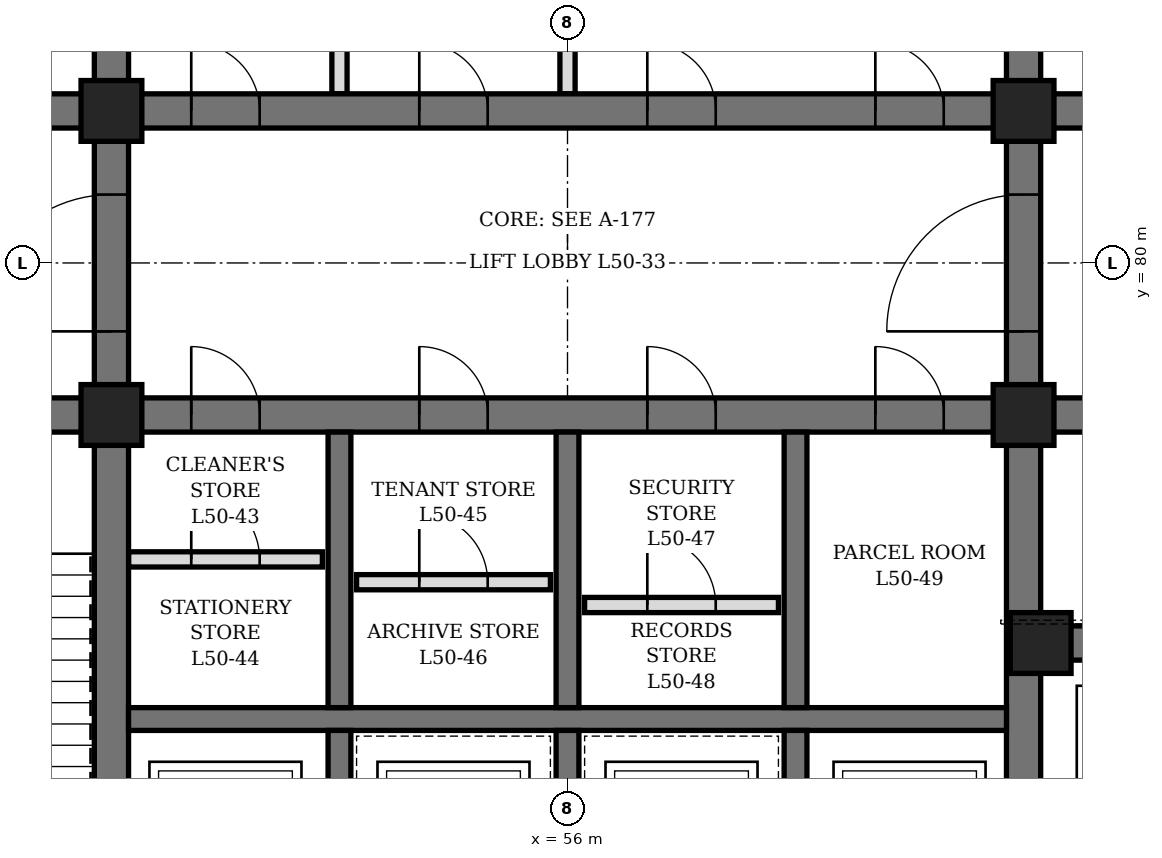
"""IFC4 building model, lengths in metres.
Left out: names, types, materials, properties, quantities, classifications, styles, units other than length and angle.
Written with IfcOpenShell. Run it as: python <this file> out.ifc"""

import sys

from ifc_helpers import new_model, si_unit, direction, frame, frame_2d, origin, origin_2d, place, context, subcontext, project, spatial, rectangle, hollow_rectangle, extrude, element, fill, save


model = new_model("IFC4")
c1 = context("Model", 3, precision=1e-05, world=origin(), true_north=direction((0.0, 1.0)))
c2 = subcontext(c1, "Body", "Model", "MODEL_VIEW")
j1 = project(units=[si_unit("LENGTHUNIT", "METRE"), si_unit("PLANEANGLEUNIT", "RADIAN")], contexts=[c1])
p1 = place(None, origin())
s1 = spatial("IfcSite", under=j1, at=p1, CompositionType="ELEMENT")
p2 = place(p1, origin())
s2 = spatial("IfcBuilding", under=s1, at=p2, CompositionType="ELEMENT")
p3 = place(p2, frame((0.0, 0.0, 223.3)))
s3 = spatial("IfcBuildingStorey", under=s2, at=p3, CompositionType="ELEMENT", Elevation=223.3)
p4 = place(p3, frame((50.0, 71.6, 0.0), z_axis=(0.0, 0.0, 1.0), x_axis=(0.0, 1.0, 0.0)))
e1 = element("IfcWall", 1, at=p4, inside=s3, PredefinedType="SHEAR", context=c2, shape_type="SweptSolid", body=[
    extrude(rectangle(XDim=16.8, YDim=0.45, at=frame_2d((8.4, 0.0))), origin(), (0.0, 0.0, 1.0), 4.2),
])
p5 = place(p4, frame((7.5, 0.0, 0.0)))
e2 = element("IfcOpeningElement", 2, at=p5, cuts=e1, PredefinedType="OPENING", context=c2, shape_type="SweptSolid", body=[
    extrude(rectangle(XDim=1.8, YDim=2.4, at=frame_2d((0.9, 1.2))), frame((0.0, 0.235, 0.0), z_axis=(0.0, -1.0, 0.0), x_axis=(1.0, 0.0, 0.0)), (0.0, 0.0, 1.0), 0.47),
])
p6 = place(p3, frame((62.0, 71.6, 0.0), z_axis=(0.0, 0.0, 1.0), x_axis=(0.0, 1.0, 0.0)))
e3 = element("IfcWall", 3, at=p6, inside=s3, PredefinedType="SHEAR", context=c2, shape_type="SweptSolid", body=[
    extrude(rectangle(XDim=16.8, YDim=0.45, at=frame_2d((8.4, 0.0))), origin(), (0.0, 0.0, 1.0), 4.2),
])
p7 = place(p6, frame((7.5, 0.0, 0.0)))
e4 = element("IfcOpeningElement", 4, at=p7, cuts=e3, PredefinedType="OPENING", context=c2, shape_type="SweptSolid", body=[
    extrude(rectangle(XDim=1.8, YDim=2.4, at=frame_2d((0.9, 1.2))), frame((0.0, 0.235, 0.0), z_axis=(0.0, -1.0, 0.0), x_axis=(1.0, 0.0, 0.0)), (0.0, 0.0, 1.0), 0.47),
])
p8 = place(p3, frame((44.6, 78.0, 0.0), z_axis=(0.0, 0.0, 1.0), x_axis=(1.0, 0.0, 0.0)))
e5 = element("IfcWall", 5, at=p8, inside=s3, PredefinedType="SHEAR", context=c2, shape_type="SweptSolid", body=[
    extrude(rectangle(XDim=5.175, YDim=0.45, at=frame_2d((2.587, 0.0))), origin(), (0.0, 0.0, 1.0), 4.2),
])
p9 = place(p8, frame((1.8, 0.0, 0.0)))
e6 = element("IfcOpeningElement", 6, at=p9, cuts=e5, PredefinedType="OPENING", context=c2, shape_type="SweptSolid", body=[
    extrude(rectangle(XDim=1.2, YDim=2.1, at=frame_2d((0.6, 1.05))), frame((0.0, 0.235, 0.0), z_axis=(0.0, -1.0, 0.0), x_axis=(1.0, 0.0, 0.0)), (0.0, 0.0, 1.0), 0.47),
])
p10 = place(p3, frame((44.6, 82.0, 0.0), z_axis=(0.0, 0.0, 1.0), x_axis=(1.0, 0.0, 0.0)))
e7 = element("IfcWall", 7, at=p10, inside=s3, PredefinedType="SHEAR", context=c2, shape_type="SweptSolid", body=[
    extrude(rectangle(XDim=5.175, YDim=0.45, at=frame_2d((2.587, 0.0))), origin(), (0.0, 0.0, 1.0), 4.2),
])
p11 = place(p10, frame((0.7, 0.0, 0.0)))
e8 = element("IfcOpeningElement", 8, at=p11, cuts=e7, PredefinedType="OPENING", context=c2, shape_type="SweptSolid", body=[
    extrude(rectangle(XDim=0.9, YDim=2.1, at=frame_2d((0.45, 1.05))), frame((0.0, 0.235, 0.0), z_axis=(0.0, -1.0, 0.0), x_axis=(1.0, 0.0, 0.0)), (0.0, 0.0, 1.0), 0.47),
])
p12 = place(p3, frame((62.225, 75.0, 0.0), z_axis=(0.0, 0.0, 1.0), x_axis=(1.0, 0.0, 0.0)))
e9 = element("IfcWall", 9, at=p12, inside=s3, PredefinedType="SHEAR", context=c2, shape_type="SweptSolid", body=[
    extrude(rectangle(XDim=5.175, YDim=0.45, at=frame_2d((2.587, 0.0))), origin(), (0.0, 0.0, 1.0), 4.2),
])
p13 = place(p12, frame((0.675, 0.0, 0.0)))
e10 = element("IfcOpeningElement", 10, at=p13, cuts=e9, PredefinedType="OPENING", context=c2, shape_type="SweptSolid", body=[
    extrude(rectangle(XDim=1.2, YDim=2.2, at=frame_2d((0.6, 1.1))), frame((0.0, 0.235, 0.0), z_axis=(0.0, -1.0, 0.0), x_axis=(1.0, 0.0, 0.0)), (0.0, 0.0, 1.0), 0.47),
])
p14 = place(p12, frame((3.425, 0.0, 0.0)))
e11 = element("IfcOpeningElement", 11, at=p14, cuts=e9, PredefinedType="OPENING", context=c2, shape_type="SweptSolid", body=[
    extrude(rectangle(XDim=1.2, YDim=2.2, at=frame_2d((0.6, 1.1))), frame((0.0, 0.235, 0.0), z_axis=(0.0, -1.0, 0.0), x_axis=(1.0, 0.0, 0.0)), (0.0, 0.0, 1.0), 0.47),
])
p15 = place(p3, frame((62.225, 78.0, 0.0), z_axis=(0.0, 0.0, 1.0), x_axis=(1.0, 0.0, 0.0)))
e12 = element("IfcWall", 12, at=p15, inside=s3, PredefinedType="SHEAR", context=c2, shape_type="SweptSolid", body=[
    extrude(rectangle(XDim=5.175, YDim=0.45, at=frame_2d((2.587, 0.0))), origin(), (0.0, 0.0, 1.0), 4.2),
])
p16 = place(p15, frame((2.175, 0.0, 0.0)))
e13 = element("IfcOpeningElement", 13, at=p16, cuts=e12, PredefinedType="OPENING", context=c2, shape_type="SweptSolid", body=[
    extrude(rectangle(XDim=1.2, YDim=2.1, at=frame_2d((0.6, 1.05))), frame((0.0, 0.235, 0.0), z_axis=(0.0, -1.0, 0.0), x_axis=(1.0, 0.0, 0.0)), (0.0, 0.0, 1.0), 0.47),
])
p17 = place(p3, frame((62.225, 82.0, 0.0), z_axis=(0.0, 0.0, 1.0), x_axis=(1.0, 0.0, 0.0)))
e14 = element("IfcWall", 14, at=p17, inside=s3, PredefinedType="SHEAR", context=c2, shape_type="SweptSolid", body=[
    extrude(rectangle(XDim=5.175, YDim=0.45, at=frame_2d((2.587, 0.0))), origin(), (0.0, 0.0, 1.0), 4.2),
])
p18 = place(p17, frame((2.175, 0.0, 0.0)))
e15 = element("IfcOpeningElement", 15, at=p18, cuts=e14, PredefinedType="OPENING", context=c2, shape_type="SweptSolid", body=[
    extrude(rectangle(XDim=1.2, YDim=2.1, at=frame_2d((0.6, 1.05))), frame((0.0, 0.235, 0.0), z_axis=(0.0, -1.0, 0.0), x_axis=(1.0, 0.0, 0.0)), (0.0, 0.0, 1.0), 0.47),
])
p19 = place(p3, frame((50.225, 78.0, 0.0), z_axis=(0.0, 0.0, 1.0), x_axis=(1.0, 0.0, 0.0)))
e16 = element("IfcWall", 16, at=p19, inside=s3, PredefinedType="SHEAR", context=c2, shape_type="SweptSolid", body=[
    extrude(rectangle(XDim=11.55, YDim=0.45, at=frame_2d((5.775, 0.0))), origin(), (0.0, 0.0, 1.0), 4.2),
])
p20 = place(p19, frame((0.825, 0.0, 0.0)))
e17 = element("IfcOpeningElement", 17, at=p20, cuts=e16, PredefinedType="OPENING", context=c2, shape_type="SweptSolid", body=[
    extrude(rectangle(XDim=0.9, YDim=2.1, at=frame_2d((0.45, 1.05))), frame((0.0, 0.235, 0.0), z_axis=(0.0, -1.0, 0.0), x_axis=(1.0, 0.0, 0.0)), (0.0, 0.0, 1.0), 0.47),
])
p21 = place(p19, frame((3.825, 0.0, 0.0)))
e18 = element("IfcOpeningElement", 18, at=p21, cuts=e16, PredefinedType="OPENING", context=c2, shape_type="SweptSolid", body=[
    extrude(rectangle(XDim=0.9, YDim=2.1, at=frame_2d((0.45, 1.05))), frame((0.0, 0.235, 0.0), z_axis=(0.0, -1.0, 0.0), x_axis=(1.0, 0.0, 0.0)), (0.0, 0.0, 1.0), 0.47),
])
p22 = place(p19, frame((6.825, 0.0, 0.0)))
e19 = element("IfcOpeningElement", 19, at=p22, cuts=e16, PredefinedType="OPENING", context=c2, shape_type="SweptSolid", body=[
    extrude(rectangle(XDim=0.9, YDim=2.1, at=frame_2d((0.45, 1.05))), frame((0.0, 0.235, 0.0), z_axis=(0.0, -1.0, 0.0), x_axis=(1.0, 0.0, 0.0)), (0.0, 0.0, 1.0), 0.47),
])
p23 = place(p19, frame((9.825, 0.0, 0.0)))
e20 = element("IfcOpeningElement", 20, at=p23, cuts=e16, PredefinedType="OPENING", context=c2, shape_type="SweptSolid", body=[
    extrude(rectangle(XDim=0.9, YDim=2.1, at=frame_2d((0.45, 1.05))), frame((0.0, 0.235, 0.0), z_axis=(0.0, -1.0, 0.0), x_axis=(1.0, 0.0, 0.0)), (0.0, 0.0, 1.0), 0.47),
])
p24 = place(p3, frame((50.225, 82.0, 0.0), z_axis=(0.0, 0.0, 1.0), x_axis=(1.0, 0.0, 0.0)))
e21 = element("IfcWall", 21, at=p24, inside=s3, PredefinedType="SHEAR", context=c2, shape_type="SweptSolid", body=[
    extrude(rectangle(XDim=11.55, YDim=0.45, at=frame_2d((5.775, 0.0))), origin(), (0.0, 0.0, 1.0), 4.2),
])
p25 = place(p24, frame((0.825, 0.0, 0.0)))
e22 = element("IfcOpeningElement", 22, at=p25, cuts=e21, PredefinedType="OPENING", context=c2, shape_type="SweptSolid", body=[
    extrude(rectangle(XDim=0.9, YDim=2.1, at=frame_2d((0.45, 1.05))), frame((0.0, 0.235, 0.0), z_axis=(0.0, -1.0, 0.0), x_axis=(1.0, 0.0, 0.0)), (0.0, 0.0, 1.0), 0.47),
])
p26 = place(p24, frame((3.825, 0.0, 0.0)))
e23 = element("IfcOpeningElement", 23, at=p26, cuts=e21, PredefinedType="OPENING", context=c2, shape_type="SweptSolid", body=[
    extrude(rectangle(XDim=0.9, YDim=2.1, at=frame_2d((0.45, 1.05))), frame((0.0, 0.235, 0.0), z_axis=(0.0, -1.0, 0.0), x_axis=(1.0, 0.0, 0.0)), (0.0, 0.0, 1.0), 0.47),
])
p27 = place(p24, frame((6.825, 0.0, 0.0)))
e24 = element("IfcOpeningElement", 24, at=p27, cuts=e21, PredefinedType="OPENING", context=c2, shape_type="SweptSolid", body=[
    extrude(rectangle(XDim=0.9, YDim=2.1, at=frame_2d((0.45, 1.05))), frame((0.0, 0.235, 0.0), z_axis=(0.0, -1.0, 0.0), x_axis=(1.0, 0.0, 0.0)), (0.0, 0.0, 1.0), 0.47),
])
p28 = place(p24, frame((9.825, 0.0, 0.0)))
e25 = element("IfcOpeningElement", 25, at=p28, cuts=e21, PredefinedType="OPENING", context=c2, shape_type="SweptSolid", body=[
    extrude(rectangle(XDim=0.9, YDim=2.1, at=frame_2d((0.45, 1.05))), frame((0.0, 0.235, 0.0), z_axis=(0.0, -1.0, 0.0), x_axis=(1.0, 0.0, 0.0)), (0.0, 0.0, 1.0), 0.47),
])
p29 = place(p3, frame((50.225, 74.0, 0.0), z_axis=(0.0, 0.0, 1.0), x_axis=(1.0, 0.0, 0.0)))
e26 = element("IfcWall", 26, at=p29, inside=s3, PredefinedType="SHEAR", context=c2, shape_type="SweptSolid", body=[
    extrude(rectangle(XDim=11.55, YDim=0.3, at=frame_2d((5.775, 0.0))), origin(), (0.0, 0.0, 1.0), 4.2),
])
p30 = place(p3, frame((53.0, 71.6, 0.0), z_axis=(0.0, 0.0, 1.0), x_axis=(0.0, 1.0, 0.0)))
e27 = element("IfcWall", 27, at=p30, inside=s3, PredefinedType="SHEAR", context=c2, shape_type="SweptSolid", body=[
    extrude(rectangle(XDim=2.25, YDim=0.3, at=frame_2d((1.125, 0.0))), origin(), (0.0, 0.0, 1.0), 4.2),
])
p31 = place(p3, frame((53.0, 74.15, 0.0), z_axis=(0.0, 0.0, 1.0), x_axis=(0.0, 1.0, 0.0)))
e28 = element("IfcWall", 28, at=p31, inside=s3, PredefinedType="SHEAR", context=c2, shape_type="SweptSolid", body=[
    extrude(rectangle(XDim=3.625, YDim=0.3, at=frame_2d((1.812, 0.0))), origin(), (0.0, 0.0, 1.0), 4.2),
])
p32 = place(p3, frame((56.0, 71.6, 0.0), z_axis=(0.0, 0.0, 1.0), x_axis=(0.0, 1.0, 0.0)))
e29 = element("IfcWall", 29, at=p32, inside=s3, PredefinedType="SHEAR", context=c2, shape_type="SweptSolid", body=[
    extrude(rectangle(XDim=2.25, YDim=0.3, at=frame_2d((1.125, 0.0))), origin(), (0.0, 0.0, 1.0), 4.2),
])
p33 = place(p3, frame((56.0, 74.15, 0.0), z_axis=(0.0, 0.0, 1.0), x_axis=(0.0, 1.0, 0.0)))
e30 = element("IfcWall", 30, at=p33, inside=s3, PredefinedType="SHEAR", context=c2, shape_type="SweptSolid", body=[
    extrude(rectangle(XDim=3.625, YDim=0.3, at=frame_2d((1.812, 0.0))), origin(), (0.0, 0.0, 1.0), 4.2),
])
p34 = place(p3, frame((59.0, 71.6, 0.0), z_axis=(0.0, 0.0, 1.0), x_axis=(0.0, 1.0, 0.0)))
e31 = element("IfcWall", 31, at=p34, inside=s3, PredefinedType="SHEAR", context=c2, shape_type="SweptSolid", body=[
    extrude(rectangle(XDim=2.25, YDim=0.3, at=frame_2d((1.125, 0.0))), origin(), (0.0, 0.0, 1.0), 4.2),
])
p35 = place(p3, frame((59.0, 74.15, 0.0), z_axis=(0.0, 0.0, 1.0), x_axis=(0.0, 1.0, 0.0)))
e32 = element("IfcWall", 32, at=p35, inside=s3, PredefinedType="SHEAR", context=c2, shape_type="SweptSolid", body=[
    extrude(rectangle(XDim=3.625, YDim=0.3, at=frame_2d((1.812, 0.0))), origin(), (0.0, 0.0, 1.0), 4.2),
])
for number, where, z_axis, x_axis in (
    (33, (50.0, 78.0, 0.0), (0.0, 0.0, 1.0), (1.0, 0.0, 0.0)),
    (34, (50.0, 82.0, 0.0), (0.0, 0.0, 1.0), (1.0, 0.0, 0.0)),
    (35, (62.0, 78.0, 0.0), (0.0, 0.0, 1.0), (1.0, 0.0, 0.0)),
    (36, (62.0, 82.0, 0.0), (0.0, 0.0, 1.0), (1.0, 0.0, 0.0)),
    (37, (62.225, 75.0, 0.0), (0.0, 0.0, 1.0), (1.0, 0.0, 0.0)),
):
    element("IfcColumn", number, at=place(p3, frame(where, z_axis=z_axis, x_axis=x_axis)), inside=s3, PredefinedType="COLUMN", context=c2, shape_type="SweptSolid", body=[
        extrude(hollow_rectangle(XDim=0.8, YDim=0.8, WallThickness=0.1, at=origin_2d()), origin(), (0.0, 0.0, 1.0), 4.2),
    ])
p36 = place(p3, frame((50.225, 76.1, 0.0), z_axis=(0.0, 0.0, 1.0), x_axis=(1.0, 0.0, 0.0)))
e38 = element("IfcWall", 38, at=p36, inside=s3, PredefinedType="PARTITIONING", context=c2, shape_type="SweptSolid", body=[
    extrude(rectangle(XDim=2.55, YDim=0.2, at=frame_2d((1.275, 0.0))), origin(), (0.0, 0.0, 1.0), 4.04),
])
p37 = place(p36, frame((0.825, 0.0, 0.0)))
e39 = element("IfcOpeningElement", 39, at=p37, cuts=e38, PredefinedType="OPENING", context=c2, shape_type="SweptSolid", body=[
    extrude(rectangle(XDim=0.9, YDim=2.1, at=frame_2d((0.45, 1.05))), frame((0.0, 0.11, 0.0), z_axis=(0.0, -1.0, 0.0), x_axis=(1.0, 0.0, 0.0)), (0.0, 0.0, 1.0), 0.22),
])
p38 = place(p3, frame((53.225, 75.8, 0.0), z_axis=(0.0, 0.0, 1.0), x_axis=(1.0, 0.0, 0.0)))
e40 = element("IfcWall", 40, at=p38, inside=s3, PredefinedType="PARTITIONING", context=c2, shape_type="SweptSolid", body=[
    extrude(rectangle(XDim=2.55, YDim=0.2, at=frame_2d((1.275, 0.0))), origin(), (0.0, 0.0, 1.0), 4.04),
])
p39 = place(p38, frame((0.825, 0.0, 0.0)))
e41 = element("IfcOpeningElement", 41, at=p39, cuts=e40, PredefinedType="OPENING", context=c2, shape_type="SweptSolid", body=[
    extrude(rectangle(XDim=0.9, YDim=2.1, at=frame_2d((0.45, 1.05))), frame((0.0, 0.11, 0.0), z_axis=(0.0, -1.0, 0.0), x_axis=(1.0, 0.0, 0.0)), (0.0, 0.0, 1.0), 0.22),
])
p40 = place(p3, frame((56.225, 75.5, 0.0), z_axis=(0.0, 0.0, 1.0), x_axis=(1.0, 0.0, 0.0)))
e42 = element("IfcWall", 42, at=p40, inside=s3, PredefinedType="PARTITIONING", context=c2, shape_type="SweptSolid", body=[
    extrude(rectangle(XDim=2.55, YDim=0.2, at=frame_2d((1.275, 0.0))), origin(), (0.0, 0.0, 1.0), 4.04),
])
p41 = place(p40, frame((0.825, 0.0, 0.0)))
e43 = element("IfcOpeningElement", 43, at=p41, cuts=e42, PredefinedType="OPENING", context=c2, shape_type="SweptSolid", body=[
    extrude(rectangle(XDim=0.9, YDim=2.1, at=frame_2d((0.45, 1.05))), frame((0.0, 0.11, 0.0), z_axis=(0.0, -1.0, 0.0), x_axis=(1.0, 0.0, 0.0)), (0.0, 0.0, 1.0), 0.22),
])
p42 = place(p3, frame((53.0, 82.225, 0.0), z_axis=(0.0, 0.0, 1.0), x_axis=(0.0, 1.0, 0.0)))
e44 = element("IfcWall", 44, at=p42, inside=s3, PredefinedType="PARTITIONING", context=c2, shape_type="SweptSolid", body=[
    extrude(rectangle(XDim=3.55, YDim=0.2, at=frame_2d((1.775, 0.0))), origin(), (0.0, 0.0, 1.0), 4.04),
])
p43 = place(p3, frame((56.0, 82.225, 0.0), z_axis=(0.0, 0.0, 1.0), x_axis=(0.0, 1.0, 0.0)))
e45 = element("IfcWall", 45, at=p43, inside=s3, PredefinedType="PARTITIONING", context=c2, shape_type="SweptSolid", body=[
    extrude(rectangle(XDim=3.55, YDim=0.2, at=frame_2d((1.775, 0.0))), origin(), (0.0, 0.0, 1.0), 3.14),
])
p44 = place(p20, origin())
e46 = element("IfcDoor", 46, at=p44, inside=s3, OperationType="SINGLE_SWING_LEFT", PredefinedType="DOOR", context=c2, shape_type="SweptSolid", body=[
    extrude(rectangle(XDim=0.9, YDim=2.1, at=frame_2d((0.45, 1.05))), frame((0.0, 0.225, 0.0), z_axis=(0.0, -1.0, 0.0), x_axis=(1.0, 0.0, 0.0)), (0.0, 0.0, 1.0), 0.449),
])
fill(e17, e46)
p45 = place(p37, origin())
e47 = element("IfcDoor", 47, at=p45, inside=s3, OperationType="SINGLE_SWING_LEFT", PredefinedType="DOOR", context=c2, shape_type="SweptSolid", body=[
    extrude(rectangle(XDim=0.9, YDim=2.1, at=frame_2d((0.45, 1.05))), frame((0.0, 0.1, 0.0), z_axis=(0.0, -1.0, 0.0), x_axis=(1.0, 0.0, 0.0)), (0.0, 0.0, 1.0), 0.199),
])
fill(e39, e47)
p46 = place(p21, origin())
e48 = element("IfcDoor", 48, at=p46, inside=s3, OperationType="SINGLE_SWING_LEFT", PredefinedType="DOOR", context=c2, shape_type="SweptSolid", body=[
    extrude(rectangle(XDim=0.9, YDim=2.1, at=frame_2d((0.45, 1.05))), frame((0.0, 0.225, 0.0), z_axis=(0.0, -1.0, 0.0), x_axis=(1.0, 0.0, 0.0)), (0.0, 0.0, 1.0), 0.449),
])
fill(e18, e48)
p47 = place(p39, origin())
e49 = element("IfcDoor", 49, at=p47, inside=s3, OperationType="SINGLE_SWING_LEFT", PredefinedType="DOOR", context=c2, shape_type="SweptSolid", body=[
    extrude(rectangle(XDim=0.9, YDim=2.1, at=frame_2d((0.45, 1.05))), frame((0.0, 0.1, 0.0), z_axis=(0.0, -1.0, 0.0), x_axis=(1.0, 0.0, 0.0)), (0.0, 0.0, 1.0), 0.199),
])
fill(e41, e49)
p48 = place(p22, origin())
e50 = element("IfcDoor", 50, at=p48, inside=s3, OperationType="SINGLE_SWING_LEFT", PredefinedType="DOOR", context=c2, shape_type="SweptSolid", body=[
    extrude(rectangle(XDim=0.9, YDim=2.1, at=frame_2d((0.45, 1.05))), frame((0.0, 0.225, 0.0), z_axis=(0.0, -1.0, 0.0), x_axis=(1.0, 0.0, 0.0)), (0.0, 0.0, 1.0), 0.449),
])
fill(e19, e50)
p49 = place(p41, origin())
e51 = element("IfcDoor", 51, at=p49, inside=s3, OperationType="SINGLE_SWING_LEFT", PredefinedType="DOOR", context=c2, shape_type="SweptSolid", body=[
    extrude(rectangle(XDim=0.9, YDim=2.1, at=frame_2d((0.45, 1.05))), frame((0.0, 0.1, 0.0), z_axis=(0.0, -1.0, 0.0), x_axis=(1.0, 0.0, 0.0)), (0.0, 0.0, 1.0), 0.199),
])
fill(e43, e51)
p50 = place(p23, origin())
e52 = element("IfcDoor", 52, at=p50, inside=s3, OperationType="SINGLE_SWING_LEFT", PredefinedType="DOOR", context=c2, shape_type="SweptSolid", body=[
    extrude(rectangle(XDim=0.9, YDim=2.1, at=frame_2d((0.45, 1.05))), frame((0.0, 0.225, 0.0), z_axis=(0.0, -1.0, 0.0), x_axis=(1.0, 0.0, 0.0)), (0.0, 0.0, 1.0), 0.449),
])
fill(e20, e52)
p51 = place(p25, origin())
e53 = element("IfcDoor", 53, at=p51, inside=s3, OperationType="SINGLE_SWING_LEFT", PredefinedType="DOOR", context=c2, shape_type="SweptSolid", body=[
    extrude(rectangle(XDim=0.9, YDim=2.1, at=frame_2d((0.45, 1.05))), frame((0.0, 0.225, 0.0), z_axis=(0.0, -1.0, 0.0), x_axis=(1.0, 0.0, 0.0)), (0.0, 0.0, 1.0), 0.449),
])
fill(e22, e53)
p52 = place(p26, origin())
e54 = element("IfcDoor", 54, at=p52, inside=s3, OperationType="SINGLE_SWING_LEFT", PredefinedType="DOOR", context=c2, shape_type="SweptSolid", body=[
    extrude(rectangle(XDim=0.9, YDim=2.1, at=frame_2d((0.45, 1.05))), frame((0.0, 0.225, 0.0), z_axis=(0.0, -1.0, 0.0), x_axis=(1.0, 0.0, 0.0)), (0.0, 0.0, 1.0), 0.449),
])
fill(e23, e54)
p53 = place(p27, origin())
e55 = element("IfcDoor", 55, at=p53, inside=s3, OperationType="SINGLE_SWING_LEFT", PredefinedType="DOOR", context=c2, shape_type="SweptSolid", body=[
    extrude(rectangle(XDim=0.9, YDim=2.1, at=frame_2d((0.45, 1.05))), frame((0.0, 0.225, 0.0), z_axis=(0.0, -1.0, 0.0), x_axis=(1.0, 0.0, 0.0)), (0.0, 0.0, 1.0), 0.449),
])
fill(e24, e55)
p54 = place(p28, origin())
e56 = element("IfcDoor", 56, at=p54, inside=s3, OperationType="SINGLE_SWING_LEFT", PredefinedType="DOOR", context=c2, shape_type="SweptSolid", body=[
    extrude(rectangle(XDim=0.9, YDim=2.1, at=frame_2d((0.45, 1.05))), frame((0.0, 0.225, 0.0), z_axis=(0.0, -1.0, 0.0), x_axis=(1.0, 0.0, 0.0)), (0.0, 0.0, 1.0), 0.449),
])
fill(e25, e56)
p55 = place(p5, origin())
e57 = element("IfcDoor", 57, at=p55, inside=s3, OperationType="DOUBLE_DOOR_SINGLE_SWING", PredefinedType="DOOR", context=c2, shape_type="SweptSolid", body=[
    extrude(rectangle(XDim=1.8, YDim=2.4, at=frame_2d((0.9, 1.2))), frame((0.0, 0.225, 0.0), z_axis=(0.0, -1.0, 0.0), x_axis=(1.0, 0.0, 0.0)), (0.0, 0.0, 1.0), 0.449),
])
fill(e2, e57)
p56 = place(p7, origin())
e58 = element("IfcDoor", 58, at=p56, inside=s3, OperationType="DOUBLE_DOOR_SINGLE_SWING", PredefinedType="DOOR", context=c2, shape_type="SweptSolid", body=[
    extrude(rectangle(XDim=1.8, YDim=2.4, at=frame_2d((0.9, 1.2))), frame((0.0, 0.225, 0.0), z_axis=(0.0, -1.0, 0.0), x_axis=(1.0, 0.0, 0.0)), (0.0, 0.0, 1.0), 0.449),
])
fill(e4, e58)
save(model, sys.argv[1])
